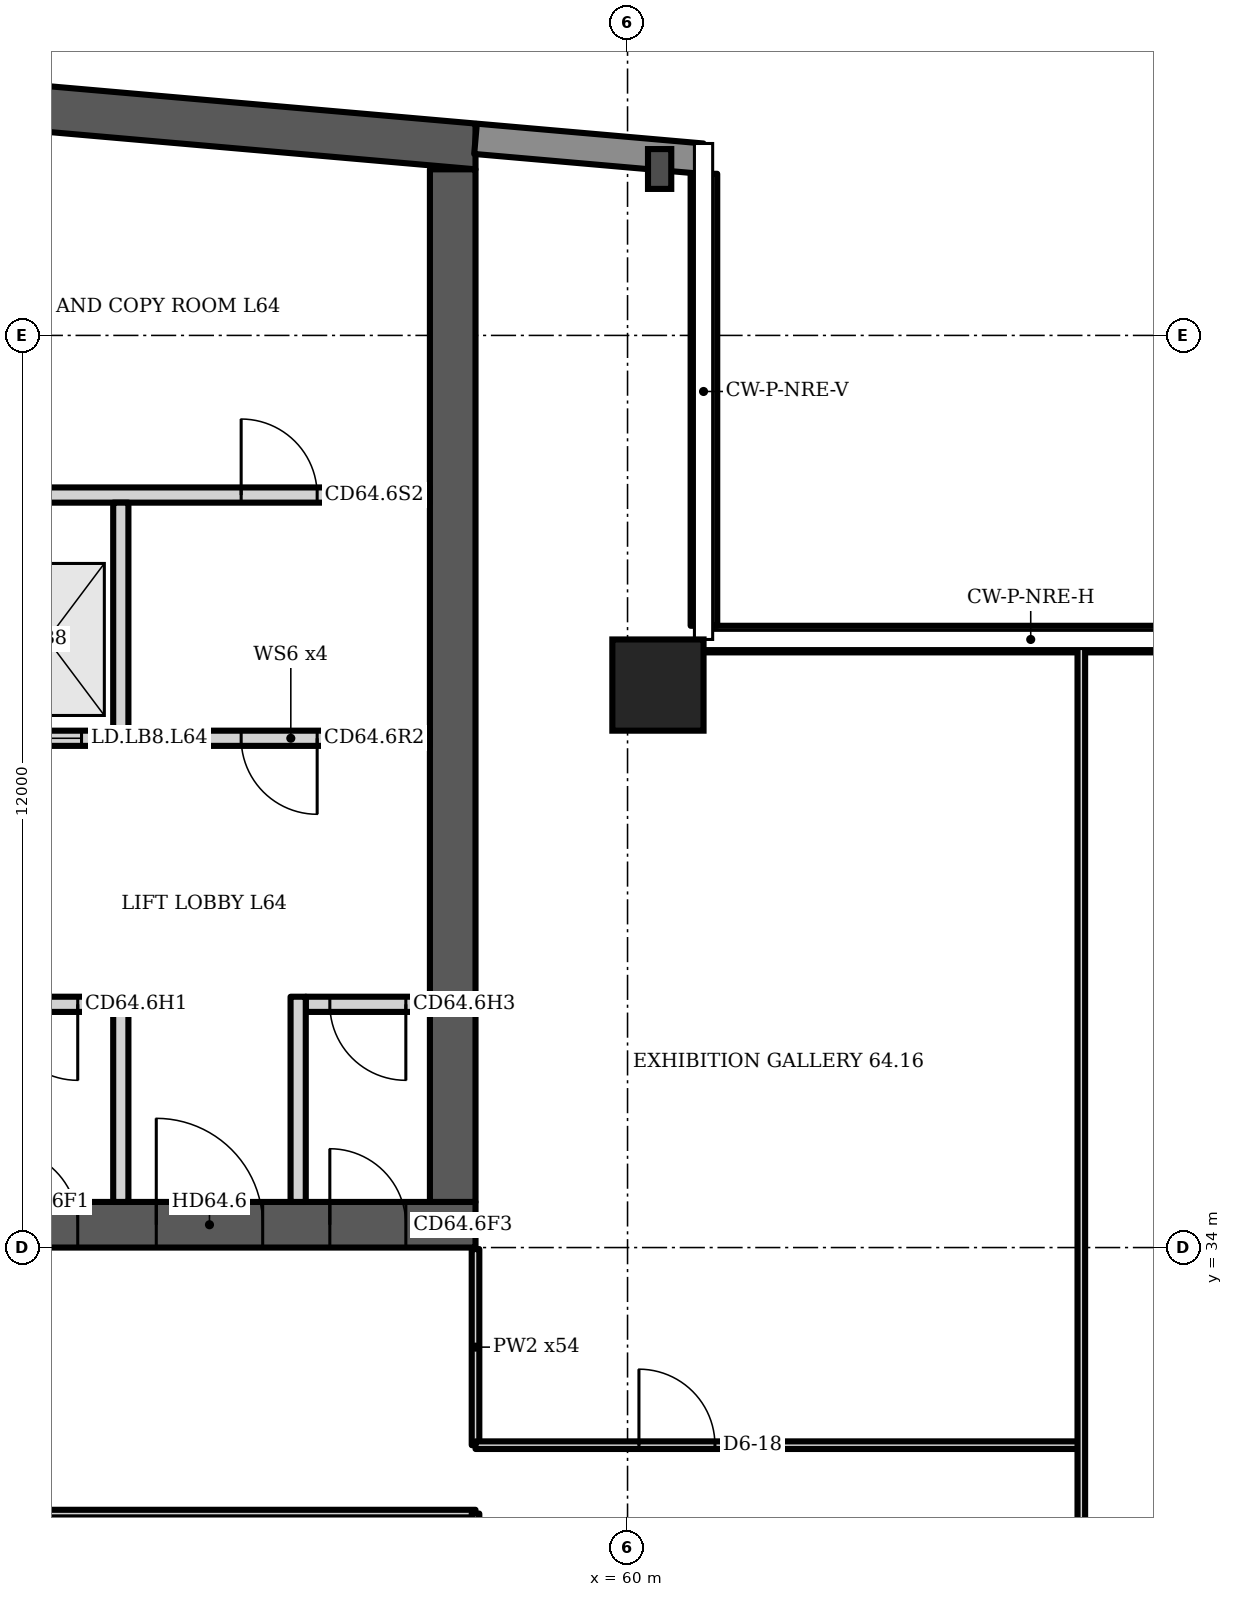
"""IFC4 building model, lengths in metres.
Left out: names, types, materials, properties, quantities, classifications, styles, units other than length and angle.
Written with IfcOpenShell. Run it as: python <this file> out.ifc"""

import sys

from ifc_helpers import new_model, si_unit, direction, frame, frame_2d, origin, origin_2d, place, context, subcontext, project, spatial, polyline, rectangle, i_section, outline, extrude, element, fill, save


model = new_model("IFC4")
c1 = context("Model", 3, precision=1e-05, world=origin(), true_north=direction((0.0, 1.0)))
c2 = subcontext(c1, "Body", "Model", "MODEL_VIEW")
j1 = project(units=[si_unit("LENGTHUNIT", "METRE"), si_unit("PLANEANGLEUNIT", "RADIAN")], contexts=[c1])
p1 = place(None, origin())
s1 = spatial("IfcSite", under=j1, at=p1, CompositionType="ELEMENT")
p2 = place(p1, origin())
s2 = spatial("IfcBuilding", under=s1, at=p2, CompositionType="ELEMENT")
p3 = place(p2, frame((0.0, 0.0, 253.9)))
s3 = spatial("IfcBuildingStorey", under=s2, at=p3, CompositionType="ELEMENT", Elevation=253.9)
p4 = place(p3, origin())
e1 = element("IfcWall", 1, at=p4, inside=s3, PredefinedType="SHEAR", context=c2, shape_type="SweptSolid", body=[
    extrude(outline(polyline([(23.0, 48.185), (40.5, 49.716), (58.0, 48.185), (58.0, 48.787), (40.5, 50.318), (23.0, 48.787), (23.0, 48.185)])), origin(), (0.0, 0.0, 1.0), 3.6),
])
p5 = place(p3, frame((23.0, 34.3, 0.0), z_axis=(0.0, 0.0, 1.0), x_axis=(1.0, 0.0, 0.0)))
e2 = element("IfcWall", 2, at=p5, inside=s3, PredefinedType="SHEAR", context=c2, shape_type="SweptSolid", body=[
    extrude(rectangle(XDim=35.0, YDim=0.6, at=frame_2d((17.5, 0.0))), origin(), (0.0, 0.0, 1.0), 3.6),
])
p6 = place(p5, frame((0.65, 0.0, 0.0)))
e3 = element("IfcOpeningElement", 3, at=p6, cuts=e2, PredefinedType="OPENING", context=c2, shape_type="SweptSolid", body=[
    extrude(rectangle(XDim=1.2, YDim=2.1, at=frame_2d((0.6, 1.05))), frame((0.0, 0.31, 0.0), z_axis=(0.0, -1.0, 0.0), x_axis=(1.0, 0.0, 0.0)), (0.0, 0.0, 1.0), 0.62),
])
p7 = place(p5, frame((7.717, 0.0, 0.0)))
e4 = element("IfcOpeningElement", 4, at=p7, cuts=e2, PredefinedType="OPENING", context=c2, shape_type="SweptSolid", body=[
    extrude(rectangle(XDim=1.1, YDim=2.1, at=frame_2d((0.55, 1.05))), frame((0.0, 0.31, 0.0), z_axis=(0.0, -1.0, 0.0), x_axis=(1.0, 0.0, 0.0)), (0.0, 0.0, 1.0), 0.62),
])
p8 = place(p5, frame((12.183, 0.0, 0.0)))
e5 = element("IfcOpeningElement", 5, at=p8, cuts=e2, PredefinedType="OPENING", context=c2, shape_type="SweptSolid", body=[
    extrude(rectangle(XDim=1.1, YDim=2.1, at=frame_2d((0.55, 1.05))), frame((0.0, 0.31, 0.0), z_axis=(0.0, -1.0, 0.0), x_axis=(1.0, 0.0, 0.0)), (0.0, 0.0, 1.0), 0.62),
])
p9 = place(p5, frame((9.8, 0.0, 0.0)))
e6 = element("IfcOpeningElement", 6, at=p9, cuts=e2, PredefinedType="OPENING", context=c2, shape_type="SweptSolid", body=[
    extrude(rectangle(XDim=1.4, YDim=2.1, at=frame_2d((0.7, 1.05))), frame((0.0, 0.31, 0.0), z_axis=(0.0, -1.0, 0.0), x_axis=(1.0, 0.0, 0.0)), (0.0, 0.0, 1.0), 0.62),
])
p10 = place(p5, frame((14.717, 0.0, 0.0)))
e7 = element("IfcOpeningElement", 7, at=p10, cuts=e2, PredefinedType="OPENING", context=c2, shape_type="SweptSolid", body=[
    extrude(rectangle(XDim=1.1, YDim=2.1, at=frame_2d((0.55, 1.05))), frame((0.0, 0.31, 0.0), z_axis=(0.0, -1.0, 0.0), x_axis=(1.0, 0.0, 0.0)), (0.0, 0.0, 1.0), 0.62),
])
p11 = place(p5, frame((16.95, 0.0, 0.0)))
e8 = element("IfcOpeningElement", 8, at=p11, cuts=e2, PredefinedType="OPENING", context=c2, shape_type="SweptSolid", body=[
    extrude(rectangle(XDim=1.1, YDim=2.1, at=frame_2d((0.55, 1.05))), frame((0.0, 0.31, 0.0), z_axis=(0.0, -1.0, 0.0), x_axis=(1.0, 0.0, 0.0)), (0.0, 0.0, 1.0), 0.62),
])
p12 = place(p5, frame((19.183, 0.0, 0.0)))
e9 = element("IfcOpeningElement", 9, at=p12, cuts=e2, PredefinedType="OPENING", context=c2, shape_type="SweptSolid", body=[
    extrude(rectangle(XDim=1.1, YDim=2.1, at=frame_2d((0.55, 1.05))), frame((0.0, 0.31, 0.0), z_axis=(0.0, -1.0, 0.0), x_axis=(1.0, 0.0, 0.0)), (0.0, 0.0, 1.0), 0.62),
])
p13 = place(p5, frame((26.15, 0.0, 0.0)))
e10 = element("IfcOpeningElement", 10, at=p13, cuts=e2, PredefinedType="OPENING", context=c2, shape_type="SweptSolid", body=[
    extrude(rectangle(XDim=1.2, YDim=2.1, at=frame_2d((0.6, 1.05))), frame((0.0, 0.31, 0.0), z_axis=(0.0, -1.0, 0.0), x_axis=(1.0, 0.0, 0.0)), (0.0, 0.0, 1.0), 0.62),
])
p14 = place(p5, frame((28.767, 0.0, 0.0)))
e11 = element("IfcOpeningElement", 11, at=p14, cuts=e2, PredefinedType="OPENING", context=c2, shape_type="SweptSolid", body=[
    extrude(rectangle(XDim=1.0, YDim=2.1, at=frame_2d((0.5, 1.05))), frame((0.0, 0.31, 0.0), z_axis=(0.0, -1.0, 0.0), x_axis=(1.0, 0.0, 0.0)), (0.0, 0.0, 1.0), 0.62),
])
p15 = place(p5, frame((33.083, 0.0, 0.0)))
e12 = element("IfcOpeningElement", 12, at=p15, cuts=e2, PredefinedType="OPENING", context=c2, shape_type="SweptSolid", body=[
    extrude(rectangle(XDim=1.0, YDim=2.1, at=frame_2d((0.5, 1.05))), frame((0.0, 0.31, 0.0), z_axis=(0.0, -1.0, 0.0), x_axis=(1.0, 0.0, 0.0)), (0.0, 0.0, 1.0), 0.62),
])
p16 = place(p5, frame((30.8, 0.0, 0.0)))
e13 = element("IfcOpeningElement", 13, at=p16, cuts=e2, PredefinedType="OPENING", context=c2, shape_type="SweptSolid", body=[
    extrude(rectangle(XDim=1.4, YDim=2.1, at=frame_2d((0.7, 1.05))), frame((0.0, 0.31, 0.0), z_axis=(0.0, -1.0, 0.0), x_axis=(1.0, 0.0, 0.0)), (0.0, 0.0, 1.0), 0.62),
])
p17 = place(p3, frame((57.7, 34.6, 0.0), z_axis=(0.0, 0.0, 1.0), x_axis=(0.0, 1.0, 0.0)))
e14 = element("IfcWall", 14, at=p17, inside=s3, PredefinedType="SHEAR", context=c2, shape_type="SweptSolid", body=[
    extrude(rectangle(XDim=13.585, YDim=0.6, at=frame_2d((6.792, 0.0))), origin(), (0.0, 0.0, 1.0), 3.6),
])
p18 = place(p3, frame((60.4, 41.4, 0.0), z_axis=(0.0, 0.0, 1.0), x_axis=(1.0, 0.0, 0.0)))
e15 = element("IfcColumn", 15, at=p18, inside=s3, PredefinedType="COLUMN", context=c2, shape_type="SweptSolid", body=[
    extrude(rectangle(XDim=1.2, YDim=1.2, at=origin_2d()), origin(), (0.0, 0.0, 1.0), 3.6),
])
p19 = place(p3, frame((60.422, 48.189, 0.0), z_axis=(0.0, 0.0, 1.0), x_axis=(1.0, 0.0, 0.0)))
e16 = element("IfcColumn", 16, at=p19, inside=s3, PredefinedType="COLUMN", context=c2, shape_type="SweptSolid", body=[
    extrude(i_section(OverallWidth=0.306, OverallDepth=0.524, WebThickness=0.021, FlangeThickness=0.04, FilletRadius=0.027, at=origin_2d()), origin(), (0.0, 0.0, 1.0), 3.6),
])
p20 = place(p3, frame((60.983, 48.326, 0.0), z_axis=(0.0, 0.0, 1.0), x_axis=(-0.996194, 0.087168, 0.0)))
e17 = element("IfcWall", 17, at=p20, inside=s3, PredefinedType="SOLIDWALL", context=c2, shape_type="SweptSolid", body=[
    extrude(rectangle(XDim=2.994, YDim=0.4, at=frame_2d((1.497, 0.0))), origin(), (0.0, 0.0, 1.0), 3.2),
])
p21 = place(p3, frame((68.803, 42.005, 0.0), z_axis=(0.0, 0.0, 1.0), x_axis=(-1.0, 0.0, 0.0)))
e18 = element("IfcWall", 18, at=p21, inside=s3, PredefinedType="SOLIDWALL", context=c2, shape_type="SweptSolid", body=[
    extrude(rectangle(XDim=7.803, YDim=0.35, at=frame_2d((3.902, 0.0))), origin(), (0.0, 0.0, 1.0), 1.0),
])
p22 = place(p3, frame((61.005, 42.18, 0.0), z_axis=(0.0, 0.0, 1.0), x_axis=(0.0, 1.0, 0.0)))
e19 = element("IfcWall", 19, at=p22, inside=s3, PredefinedType="SOLIDWALL", context=c2, shape_type="SweptSolid", body=[
    extrude(rectangle(XDim=5.947, YDim=0.35, at=frame_2d((2.973, 0.0))), origin(), (0.0, 0.0, 1.0), 1.0),
])
p23 = place(p3, frame((51.3, 37.2, 0.0), z_axis=(0.0, 0.0, 1.0), x_axis=(1.0, 0.0, 0.0)))
e20 = element("IfcWall", 20, at=p23, inside=s3, PredefinedType="PARTITIONING", context=c2, shape_type="SweptSolid", body=[
    extrude(rectangle(XDim=1.933, YDim=0.2, at=frame_2d((0.967, 0.0))), origin(), (0.0, 0.0, 1.0), 3.2),
])
p24 = place(p23, frame((0.467, 0.0, 0.0)))
e21 = element("IfcOpeningElement", 21, at=p24, cuts=e20, PredefinedType="OPENING", context=c2, shape_type="SweptSolid", body=[
    extrude(rectangle(XDim=1.0, YDim=2.1, at=frame_2d((0.5, 1.05))), frame((0.0, 0.11, 0.0), z_axis=(0.0, -1.0, 0.0), x_axis=(1.0, 0.0, 0.0)), (0.0, 0.0, 1.0), 0.22),
])
p25 = place(p3, frame((55.767, 37.2, 0.0), z_axis=(0.0, 0.0, 1.0), x_axis=(1.0, 0.0, 0.0)))
e22 = element("IfcWall", 22, at=p25, inside=s3, PredefinedType="PARTITIONING", context=c2, shape_type="SweptSolid", body=[
    extrude(rectangle(XDim=1.633, YDim=0.2, at=frame_2d((0.817, 0.0))), origin(), (0.0, 0.0, 1.0), 3.2),
])
p26 = place(p25, frame((0.317, 0.0, 0.0)))
e23 = element("IfcOpeningElement", 23, at=p26, cuts=e22, PredefinedType="OPENING", context=c2, shape_type="SweptSolid", body=[
    extrude(rectangle(XDim=1.0, YDim=2.1, at=frame_2d((0.5, 1.05))), frame((0.0, 0.11, 0.0), z_axis=(0.0, -1.0, 0.0), x_axis=(1.0, 0.0, 0.0)), (0.0, 0.0, 1.0), 0.22),
])
p27 = place(p3, frame((51.3, 40.7, 0.0), z_axis=(0.0, 0.0, 1.0), x_axis=(1.0, 0.0, 0.0)))
e24 = element("IfcWall", 24, at=p27, inside=s3, PredefinedType="PARTITIONING", context=c2, shape_type="SweptSolid", body=[
    extrude(rectangle(XDim=6.1, YDim=0.2, at=frame_2d((3.05, 0.0))), origin(), (0.0, 0.0, 1.0), 3.2),
])
p28 = place(p27, frame((0.417, 0.0, 0.0)))
e25 = element("IfcOpeningElement", 25, at=p28, cuts=e24, PredefinedType="OPENING", context=c2, shape_type="SweptSolid", body=[
    extrude(rectangle(XDim=1.1, YDim=2.1, at=frame_2d((0.55, 1.05))), frame((0.0, 0.11, 0.0), z_axis=(0.0, -1.0, 0.0), x_axis=(1.0, 0.0, 0.0)), (0.0, 0.0, 1.0), 0.22),
])
p29 = place(p27, frame((3.617, 0.0, 0.0)))
e26 = element("IfcOpeningElement", 26, at=p29, cuts=e24, PredefinedType="OPENING", context=c2, shape_type="SweptSolid", body=[
    extrude(rectangle(XDim=1.0, YDim=2.1, at=frame_2d((0.5, 1.05))), frame((0.0, 0.11, 0.0), z_axis=(0.0, -1.0, 0.0), x_axis=(1.0, 0.0, 0.0)), (0.0, 0.0, 1.0), 0.22),
])
p30 = place(p3, frame((51.3, 43.9, 0.0), z_axis=(0.0, 0.0, 1.0), x_axis=(1.0, 0.0, 0.0)))
e27 = element("IfcWall", 27, at=p30, inside=s3, PredefinedType="PARTITIONING", context=c2, shape_type="SweptSolid", body=[
    extrude(rectangle(XDim=6.1, YDim=0.2, at=frame_2d((3.05, 0.0))), origin(), (0.0, 0.0, 1.0), 3.2),
])
p31 = place(p30, frame((3.617, 0.0, 0.0)))
e28 = element("IfcOpeningElement", 28, at=p31, cuts=e27, PredefinedType="OPENING", context=c2, shape_type="SweptSolid", body=[
    extrude(rectangle(XDim=1.0, YDim=2.1, at=frame_2d((0.5, 1.05))), frame((0.0, 0.11, 0.0), z_axis=(0.0, -1.0, 0.0), x_axis=(1.0, 0.0, 0.0)), (0.0, 0.0, 1.0), 0.22),
])
p32 = place(p3, origin())
e29 = element("IfcWall", 29, at=p32, inside=s3, PredefinedType="PARTITIONING", context=c2, shape_type="SweptSolid", body=[
    extrude(outline(polyline([(53.233, 34.6), (53.233, 37.3), (53.433, 37.3), (53.433, 34.6), (53.233, 34.6)])), origin(), (0.0, 0.0, 1.0), 3.2),
])
p33 = place(p3, origin())
e30 = element("IfcWall", 30, at=p33, inside=s3, PredefinedType="PARTITIONING", context=c2, shape_type="SweptSolid", body=[
    extrude(outline(polyline([(55.567, 34.6), (55.567, 37.3), (55.767, 37.3), (55.767, 34.6), (55.567, 34.6)])), origin(), (0.0, 0.0, 1.0), 3.2),
])
p34 = place(p3, origin())
e31 = element("IfcWall", 31, at=p34, inside=s3, PredefinedType="PARTITIONING", context=c2, shape_type="SweptSolid", body=[
    extrude(outline(polyline([(53.433, 40.8), (53.433, 43.8), (53.233, 43.8), (53.233, 40.8), (53.433, 40.8)])), origin(), (0.0, 0.0, 1.0), 3.2),
])
p35 = place(p3, frame((51.82, 30.5, 0.0), z_axis=(0.0, 0.0, 1.0), x_axis=(1.0, 0.0, 0.0)))
e32 = element("IfcWall", 32, at=p35, inside=s3, PredefinedType="PARTITIONING", context=c2, shape_type="SweptSolid", body=[
    extrude(rectangle(XDim=6.18, YDim=0.1, at=frame_2d((3.09, 0.0))), origin(), (0.0, 0.0, 1.0), 3.2),
])
p36 = place(p3, frame((58.0, 29.6, 0.0), z_axis=(0.0, 0.0, 1.0), x_axis=(0.0, 1.0, 0.0)))
e33 = element("IfcWall", 33, at=p36, inside=s3, PredefinedType="PARTITIONING", context=c2, shape_type="SweptSolid", body=[
    extrude(rectangle(XDim=0.9, YDim=0.1, at=frame_2d((0.45, 0.0))), origin(), (0.0, 0.0, 1.0), 3.2),
])
p37 = place(p3, frame((58.0, 31.4, 0.0), z_axis=(0.0, 0.0, 1.0), x_axis=(0.0, 1.0, 0.0)))
e34 = element("IfcWall", 34, at=p37, inside=s3, PredefinedType="PARTITIONING", context=c2, shape_type="SweptSolid", body=[
    extrude(rectangle(XDim=2.58, YDim=0.1, at=frame_2d((1.29, 0.0))), origin(), (0.0, 0.0, 1.0), 3.2),
])
p38 = place(p3, frame((58.0, 31.4, 0.0), z_axis=(0.0, 0.0, 1.0), x_axis=(1.0, 0.0, 0.0)))
e35 = element("IfcWall", 35, at=p38, inside=s3, PredefinedType="PARTITIONING", context=c2, shape_type="SweptSolid", body=[
    extrude(rectangle(XDim=7.97, YDim=0.1, at=frame_2d((3.985, 0.0))), origin(), (0.0, 0.0, 1.0), 3.2),
])
p39 = place(p38, frame((2.15, 0.0, 0.0)))
e36 = element("IfcOpeningElement", 36, at=p39, cuts=e35, PredefinedType="OPENING", context=c2, shape_type="SweptSolid", body=[
    extrude(rectangle(XDim=1.0, YDim=2.1, at=frame_2d((0.5, 1.05))), frame((0.0, 0.06, 0.0), z_axis=(0.0, -1.0, 0.0), x_axis=(1.0, 0.0, 0.0)), (0.0, 0.0, 1.0), 0.12),
])
p40 = place(p3, frame((65.97, 29.545, 0.0), z_axis=(0.0, 0.0, 1.0), x_axis=(0.0, 1.0, 0.0)))
e37 = element("IfcWall", 37, at=p40, inside=s3, PredefinedType="PARTITIONING", context=c2, shape_type="SweptSolid", body=[
    extrude(rectangle(XDim=12.435, YDim=0.1, at=frame_2d((6.218, 0.0))), origin(), (0.0, 0.0, 1.0), 3.2),
])
p41 = place(p14, origin())
e38 = element("IfcDoor", 38, at=p41, inside=s3, OperationType="SINGLE_SWING_LEFT", PredefinedType="DOOR", context=c2, shape_type="SweptSolid", body=[
    extrude(rectangle(XDim=1.0, YDim=2.1, at=frame_2d((0.5, 1.05))), frame((0.0, 0.025, 0.0), z_axis=(0.0, -1.0, 0.0), x_axis=(1.0, 0.0, 0.0)), (0.0, 0.0, 1.0), 0.05),
])
fill(e11, e38)
p42 = place(p24, origin())
e39 = element("IfcDoor", 39, at=p42, inside=s3, OperationType="SINGLE_SWING_RIGHT", PredefinedType="DOOR", context=c2, shape_type="SweptSolid", body=[
    extrude(rectangle(XDim=1.0, YDim=2.1, at=frame_2d((0.5, 1.05))), frame((0.0, 0.025, 0.0), z_axis=(0.0, -1.0, 0.0), x_axis=(1.0, 0.0, 0.0)), (0.0, 0.0, 1.0), 0.05),
])
fill(e21, e39)
p43 = place(p15, origin())
e40 = element("IfcDoor", 40, at=p43, inside=s3, OperationType="SINGLE_SWING_LEFT", PredefinedType="DOOR", context=c2, shape_type="SweptSolid", body=[
    extrude(rectangle(XDim=1.0, YDim=2.1, at=frame_2d((0.5, 1.05))), frame((0.0, 0.025, 0.0), z_axis=(0.0, -1.0, 0.0), x_axis=(1.0, 0.0, 0.0)), (0.0, 0.0, 1.0), 0.05),
])
fill(e12, e40)
p44 = place(p26, origin())
e41 = element("IfcDoor", 41, at=p44, inside=s3, OperationType="SINGLE_SWING_RIGHT", PredefinedType="DOOR", context=c2, shape_type="SweptSolid", body=[
    extrude(rectangle(XDim=1.0, YDim=2.1, at=frame_2d((0.5, 1.05))), frame((0.0, 0.025, 0.0), z_axis=(0.0, -1.0, 0.0), x_axis=(1.0, 0.0, 0.0)), (0.0, 0.0, 1.0), 0.05),
])
fill(e23, e41)
p45 = place(p16, origin())
e42 = element("IfcDoor", 42, at=p45, inside=s3, OperationType="DOUBLE_DOOR_SINGLE_SWING", PredefinedType="DOOR", context=c2, shape_type="SweptSolid", body=[
    extrude(rectangle(XDim=1.4, YDim=2.1, at=frame_2d((0.7, 1.05))), frame((0.0, 0.025, 0.0), z_axis=(0.0, -1.0, 0.0), x_axis=(1.0, 0.0, 0.0)), (0.0, 0.0, 1.0), 0.05),
])
fill(e13, e42)
p46 = place(p28, origin())
e43 = element("IfcDoor", 43, at=p46, inside=s3, OperationType="DOUBLE_DOOR_SLIDING", PredefinedType="DOOR", context=c2, shape_type="SweptSolid", body=[
    extrude(rectangle(XDim=1.1, YDim=2.1, at=frame_2d((0.55, 1.05))), frame((0.0, 0.025, 0.0), z_axis=(0.0, -1.0, 0.0), x_axis=(1.0, 0.0, 0.0)), (0.0, 0.0, 1.0), 0.05),
])
fill(e25, e43)
p47 = place(p29, origin())
e44 = element("IfcDoor", 44, at=p47, inside=s3, OperationType="SINGLE_SWING_RIGHT", PredefinedType="DOOR", context=c2, shape_type="SweptSolid", body=[
    extrude(rectangle(XDim=1.0, YDim=2.1, at=frame_2d((0.5, 1.05))), frame((0.0, 0.025, 0.0), z_axis=(0.0, -1.0, 0.0), x_axis=(1.0, 0.0, 0.0)), (0.0, 0.0, 1.0), 0.05),
])
fill(e26, e44)
p48 = place(p31, origin())
e45 = element("IfcDoor", 45, at=p48, inside=s3, OperationType="SINGLE_SWING_LEFT", PredefinedType="DOOR", context=c2, shape_type="SweptSolid", body=[
    extrude(rectangle(XDim=1.0, YDim=2.1, at=frame_2d((0.5, 1.05))), frame((0.0, 0.025, 0.0), z_axis=(0.0, -1.0, 0.0), x_axis=(1.0, 0.0, 0.0)), (0.0, 0.0, 1.0), 0.05),
])
fill(e28, e45)
p49 = place(p39, origin())
e46 = element("IfcDoor", 46, at=p49, inside=s3, OperationType="SINGLE_SWING_LEFT", PredefinedType="DOOR", context=c2, shape_type="SweptSolid", body=[
    extrude(rectangle(XDim=1.0, YDim=2.1, at=frame_2d((0.5, 1.05))), frame((0.0, 0.025, 0.0), z_axis=(0.0, -1.0, 0.0), x_axis=(1.0, 0.0, 0.0)), (0.0, 0.0, 1.0), 0.05),
])
fill(e36, e46)
save(model, sys.argv[1])
